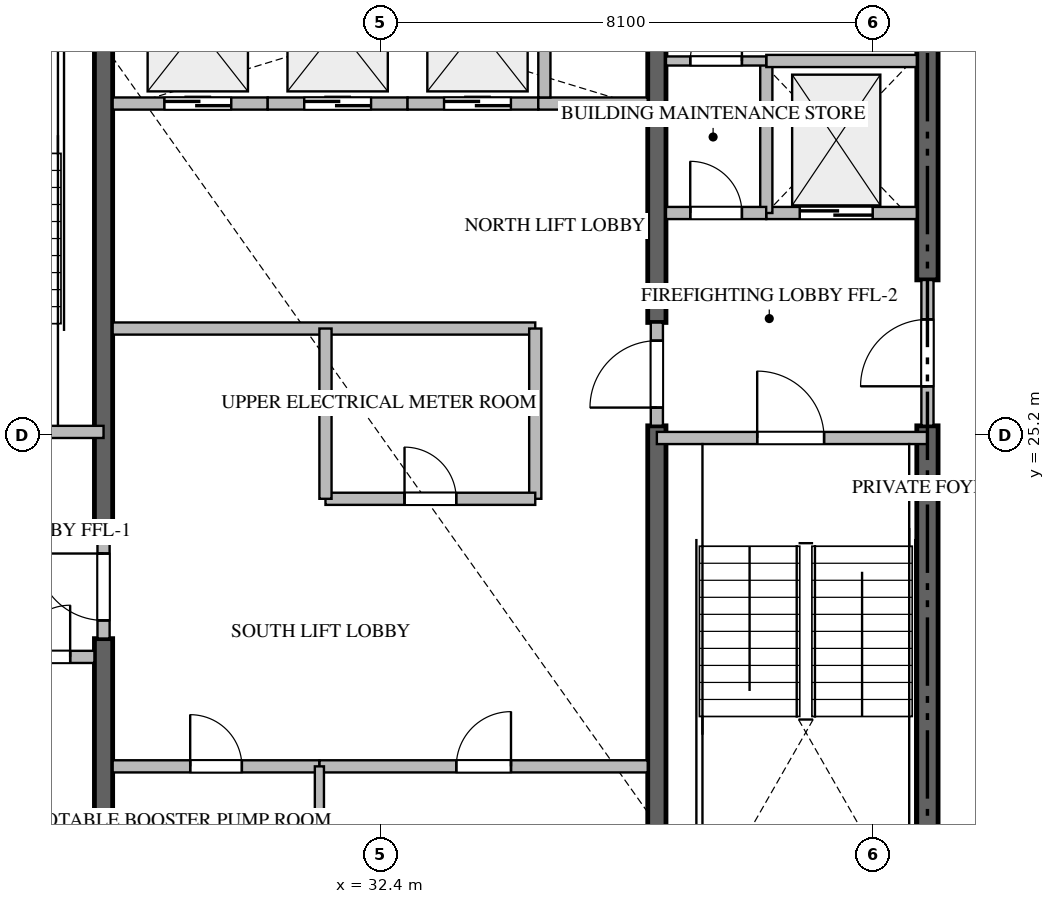
"""IFC4 building model, lengths in metres.
Left out: names, types, materials, properties, quantities, classifications, styles, units other than length and angle.
Written with IfcOpenShell. Run it as: python <this file> out.ifc"""

import sys

from ifc_helpers import new_model, si_unit, direction, frame, frame_2d, origin, place, context, subcontext, project, spatial, rectangle, extrude, source, transform, mapped, element, fill, save


model = new_model("IFC4")
c1 = context("Model", 3, precision=1e-05, world=origin(), true_north=direction((0.0, 1.0)))
c2 = subcontext(c1, "Body", "Model", "MODEL_VIEW")
j1 = project(units=[si_unit("LENGTHUNIT", "METRE"), si_unit("PLANEANGLEUNIT", "RADIAN")], contexts=[c1])
p1 = place(None, origin())
s1 = spatial("IfcSite", under=j1, at=p1, CompositionType="ELEMENT")
p2 = place(p1, origin())
s2 = spatial("IfcBuilding", under=s1, at=p2, CompositionType="ELEMENT")
p3 = place(p2, frame((0.0, 0.0, 279.75)))
s3 = spatial("IfcBuildingStorey", under=s2, at=p3, CompositionType="ELEMENT", Elevation=279.75)
p4 = place(p3, frame((41.4, 16.975, -0.26), z_axis=(0.0, 0.0, 1.0), x_axis=(0.0, 1.0, 0.0)))
e1 = element("IfcWall", 1, at=p4, inside=s3, PredefinedType="SHEAR", context=c2, shape_type="SweptSolid", body=[
    extrude(rectangle(XDim=8.375, YDim=0.35, at=frame_2d((4.188, 0.0))), origin(), (0.0, 0.0, 1.0), 3.848),
])
p5 = place(p3, frame((41.4, 27.75, -0.26), z_axis=(0.0, 0.0, 1.0), x_axis=(0.0, 1.0, 0.0)))
e2 = element("IfcWall", 2, at=p5, inside=s3, PredefinedType="SHEAR", context=c2, shape_type="SweptSolid", body=[
    extrude(rectangle(XDim=5.675, YDim=0.35, at=frame_2d((2.837, 0.0))), origin(), (0.0, 0.0, 1.0), 3.848),
])
p6 = place(p3, frame((27.85, 16.975, -0.26), z_axis=(0.0, 0.0, 1.0), x_axis=(0.0, 1.0, 0.0)))
e3 = element("IfcWall", 3, at=p6, inside=s3, PredefinedType="SHEAR", context=c2, shape_type="SweptSolid", body=[
    extrude(rectangle(XDim=4.875, YDim=0.3, at=frame_2d((2.438, 0.0))), origin(), (0.0, 0.0, 1.0), 3.848),
])
p7 = place(p3, frame((27.85, 23.55, -0.26), z_axis=(0.0, 0.0, 1.0), x_axis=(0.0, 1.0, 0.0)))
e4 = element("IfcWall", 4, at=p7, inside=s3, PredefinedType="SHEAR", context=c2, shape_type="SweptSolid", body=[
    extrude(rectangle(XDim=9.875, YDim=0.3, at=frame_2d((4.938, 0.0))), origin(), (0.0, 0.0, 1.0), 3.848),
])
p8 = place(p3, frame((36.95, 16.975, -0.26), z_axis=(0.0, 0.0, 1.0), x_axis=(0.0, 1.0, 0.0)))
e5 = element("IfcWall", 5, at=p8, inside=s3, PredefinedType="SHEAR", context=c2, shape_type="SweptSolid", body=[
    extrude(rectangle(XDim=8.375, YDim=0.3, at=frame_2d((4.188, 0.0))), origin(), (0.0, 0.0, 1.0), 3.848),
])
p9 = place(p3, frame((36.95, 27.05, -0.26), z_axis=(0.0, 0.0, 1.0), x_axis=(0.0, 1.0, 0.0)))
e6 = element("IfcWall", 6, at=p9, inside=s3, PredefinedType="SHEAR", context=c2, shape_type="SweptSolid", body=[
    extrude(rectangle(XDim=6.375, YDim=0.3, at=frame_2d((3.188, 0.0))), origin(), (0.0, 0.0, 1.0), 3.848),
])
p10 = place(p3, frame((23.4, 25.25, 0.0), z_axis=(0.0, 0.0, 1.0), x_axis=(1.0, 0.0, 0.0)))
e7 = element("IfcWall", 7, at=p10, inside=s3, PredefinedType="STANDARD", context=c2, shape_type="SweptSolid", body=[
    extrude(rectangle(XDim=4.45, YDim=0.2, at=frame_2d((2.225, 0.0))), origin(), (0.0, 0.0, 1.0), 3.59),
])
p11 = place(p10, frame((1.65, 0.0, 0.0)))
e8 = element("IfcOpeningElement", 8, at=p11, cuts=e7, PredefinedType="OPENING", context=c2, shape_type="SweptSolid", body=[
    extrude(rectangle(XDim=1.1, YDim=2.15, at=frame_2d((0.55, 1.075))), frame((0.0, 0.11, 0.0), z_axis=(0.0, -1.0, 0.0), x_axis=(1.0, 0.0, 0.0)), (0.0, 0.0, 1.0), 0.22),
])
p12 = place(p3, frame((36.95, 25.15, 0.0), z_axis=(0.0, 0.0, 1.0), x_axis=(1.0, 0.0, 0.0)))
e9 = element("IfcWall", 9, at=p12, inside=s3, PredefinedType="STANDARD", context=c2, shape_type="SweptSolid", body=[
    extrude(rectangle(XDim=4.45, YDim=0.2, at=frame_2d((2.225, 0.0))), origin(), (0.0, 0.0, 1.0), 3.59),
])
p13 = place(p12, frame((1.65, 0.0, 0.0)))
e10 = element("IfcOpeningElement", 10, at=p13, cuts=e9, PredefinedType="OPENING", context=c2, shape_type="SweptSolid", body=[
    extrude(rectangle(XDim=1.1, YDim=2.15, at=frame_2d((0.55, 1.075))), frame((0.0, 0.11, 0.0), z_axis=(0.0, -1.0, 0.0), x_axis=(1.0, 0.0, 0.0)), (0.0, 0.0, 1.0), 0.22),
])
p14 = place(p3, frame((38.75, 28.85, 0.0), z_axis=(0.0, 0.0, 1.0), x_axis=(1.0, 0.0, 0.0)))
e11 = element("IfcWall", 11, at=p14, inside=s3, PredefinedType="STANDARD", context=c2, shape_type="SweptSolid", body=[
    extrude(rectangle(XDim=2.475, YDim=0.2, at=frame_2d((1.238, 0.0))), origin(), (0.0, 0.0, 1.0), 3.59),
])
p15 = place(p14, frame((0.55, 0.0, 0.0)))
e12 = element("IfcOpeningElement", 12, at=p15, cuts=e11, PredefinedType="OPENING", context=c2, shape_type="SweptSolid", body=[
    extrude(rectangle(XDim=1.2, YDim=2.2, at=frame_2d((0.6, 1.1))), frame((0.0, 0.11, 0.0), z_axis=(0.0, -1.0, 0.0), x_axis=(1.0, 0.0, 0.0)), (0.0, 0.0, 1.0), 0.22),
])
p16 = place(p3, frame((28.0, 30.65, 0.0), z_axis=(0.0, 0.0, 1.0), x_axis=(1.0, 0.0, 0.0)))
e13 = element("IfcWall", 13, at=p16, inside=s3, PredefinedType="STANDARD", context=c2, shape_type="SweptSolid", body=[
    extrude(rectangle(XDim=2.55, YDim=0.2, at=frame_2d((1.275, 0.0))), origin(), (0.0, 0.0, 1.0), 3.59),
])
p17 = place(p16, frame((0.85, 0.0, 0.0)))
e14 = element("IfcOpeningElement", 14, at=p17, cuts=e13, PredefinedType="OPENING", context=c2, shape_type="SweptSolid", body=[
    extrude(rectangle(XDim=1.1, YDim=2.2, at=frame_2d((0.55, 1.1))), frame((0.0, 0.11, 0.0), z_axis=(0.0, -1.0, 0.0), x_axis=(1.0, 0.0, 0.0)), (0.0, 0.0, 1.0), 0.22),
])
p18 = place(p3, frame((30.55, 30.65, 0.0), z_axis=(0.0, 0.0, 1.0), x_axis=(1.0, 0.0, 0.0)))
e15 = element("IfcWall", 15, at=p18, inside=s3, PredefinedType="STANDARD", context=c2, shape_type="SweptSolid", body=[
    extrude(rectangle(XDim=2.3, YDim=0.2, at=frame_2d((1.15, 0.0))), origin(), (0.0, 0.0, 1.0), 3.59),
])
p19 = place(p18, frame((0.6, 0.0, 0.0)))
e16 = element("IfcOpeningElement", 16, at=p19, cuts=e15, PredefinedType="OPENING", context=c2, shape_type="SweptSolid", body=[
    extrude(rectangle(XDim=1.1, YDim=2.2, at=frame_2d((0.55, 1.1))), frame((0.0, 0.11, 0.0), z_axis=(0.0, -1.0, 0.0), x_axis=(1.0, 0.0, 0.0)), (0.0, 0.0, 1.0), 0.22),
])
p20 = place(p3, frame((32.85, 30.65, 0.0), z_axis=(0.0, 0.0, 1.0), x_axis=(1.0, 0.0, 0.0)))
e17 = element("IfcWall", 17, at=p20, inside=s3, PredefinedType="STANDARD", context=c2, shape_type="SweptSolid", body=[
    extrude(rectangle(XDim=2.15, YDim=0.2, at=frame_2d((1.075, 0.0))), origin(), (0.0, 0.0, 1.0), 3.59),
])
p21 = place(p20, frame((0.6, 0.0, 0.0)))
e18 = element("IfcOpeningElement", 18, at=p21, cuts=e17, PredefinedType="OPENING", context=c2, shape_type="SweptSolid", body=[
    extrude(rectangle(XDim=1.1, YDim=2.2, at=frame_2d((0.55, 1.1))), frame((0.0, 0.11, 0.0), z_axis=(0.0, -1.0, 0.0), x_axis=(1.0, 0.0, 0.0)), (0.0, 0.0, 1.0), 0.22),
])
p22 = place(p3, frame((35.0, 30.65, 0.0), z_axis=(0.0, 0.0, 1.0), x_axis=(1.0, 0.0, 0.0)))
e19 = element("IfcWall", 19, at=p22, inside=s3, PredefinedType="STANDARD", context=c2, shape_type="SweptSolid", body=[
    extrude(rectangle(XDim=1.8, YDim=0.2, at=frame_2d((0.9, 0.0))), origin(), (0.0, 0.0, 1.0), 3.59),
])
p23 = place(p3, frame((35.1, 30.75, 0.0), z_axis=(0.0, 0.0, 1.0), x_axis=(0.0, 1.0, 0.0)))
e20 = element("IfcWall", 20, at=p23, inside=s3, PredefinedType="STANDARD", context=c2, shape_type="SweptSolid", body=[
    extrude(rectangle(XDim=2.675, YDim=0.2, at=frame_2d((1.337, 0.0))), origin(), (0.0, 0.0, 1.0), 3.59),
])
p24 = place(p3, frame((26.052, 21.55, 0.0), z_axis=(0.0, 0.0, 1.0), x_axis=(1.0, 0.0, 0.0)))
e21 = element("IfcWall", 21, at=p24, inside=s3, PredefinedType="STANDARD", context=c2, shape_type="SweptSolid", body=[
    extrude(rectangle(XDim=1.648, YDim=0.2, at=frame_2d((0.824, 0.0))), origin(), (0.0, 0.0, 1.0), 3.59),
])
p25 = place(p24, frame((0.399, 0.0, 0.0)))
e22 = element("IfcOpeningElement", 22, at=p25, cuts=e21, PredefinedType="OPENING", context=c2, shape_type="SweptSolid", body=[
    extrude(rectangle(XDim=0.85, YDim=2.1, at=frame_2d((0.425, 1.05))), frame((0.0, 0.11, 0.0), z_axis=(0.0, -1.0, 0.0), x_axis=(1.0, 0.0, 0.0)), (0.0, 0.0, 1.0), 0.22),
])
p26 = place(p3, frame((38.75, 28.85, 0.0), z_axis=(0.0, 0.0, 1.0), x_axis=(0.0, 1.0, 0.0)))
e23 = element("IfcWall", 23, at=p26, inside=s3, PredefinedType="STANDARD", context=c2, shape_type="SweptSolid", body=[
    extrude(rectangle(XDim=2.5, YDim=0.2, at=frame_2d((1.25, 0.0))), origin(), (0.0, 0.0, 1.0), 3.59),
])
p27 = place(p3, frame((38.75, 31.35, 0.0), z_axis=(0.0, 0.0, 1.0), x_axis=(1.0, 0.0, 0.0)))
e24 = element("IfcWall", 24, at=p27, inside=s3, PredefinedType="STANDARD", context=c2, shape_type="SweptSolid", body=[
    extrude(rectangle(XDim=2.475, YDim=0.2, at=frame_2d((1.238, 0.0))), origin(), (0.0, 0.0, 1.0), 3.59),
])
p28 = place(p3, frame((37.1, 28.85, 0.0), z_axis=(0.0, 0.0, 1.0), x_axis=(1.0, 0.0, 0.0)))
e25 = element("IfcWall", 25, at=p28, inside=s3, PredefinedType="STANDARD", context=c2, shape_type="SweptSolid", body=[
    extrude(rectangle(XDim=1.648, YDim=0.2, at=frame_2d((0.824, 0.0))), origin(), (0.0, 0.0, 1.0), 3.59),
])
p29 = place(p28, frame((0.399, 0.0, 0.0)))
e26 = element("IfcOpeningElement", 26, at=p29, cuts=e25, PredefinedType="OPENING", context=c2, shape_type="SweptSolid", body=[
    extrude(rectangle(XDim=0.85, YDim=2.1, at=frame_2d((0.425, 1.05))), frame((0.0, 0.11, 0.0), z_axis=(0.0, -1.0, 0.0), x_axis=(1.0, 0.0, 0.0)), (0.0, 0.0, 1.0), 0.22),
])
p30 = place(p3, frame((41.4, 25.352, 0.0), z_axis=(0.0, 0.0, 1.0), x_axis=(0.0, 1.0, 0.0)))
e27 = element("IfcWall", 27, at=p30, inside=s3, PredefinedType="STANDARD", context=c2, shape_type="SweptSolid", body=[
    extrude(rectangle(XDim=2.396, YDim=0.2, at=frame_2d((1.198, 0.0))), origin(), (0.0, 0.0, 1.0), 3.59),
])
p31 = place(p30, frame((0.648, 0.0, 0.0)))
e28 = element("IfcOpeningElement", 28, at=p31, cuts=e27, PredefinedType="OPENING", context=c2, shape_type="SweptSolid", body=[
    extrude(rectangle(XDim=1.1, YDim=2.15, at=frame_2d((0.55, 1.075))), frame((0.0, 0.11, 0.0), z_axis=(0.0, -1.0, 0.0), x_axis=(1.0, 0.0, 0.0)), (0.0, 0.0, 1.0), 0.22),
])
p32 = place(p3, frame((27.85, 21.852, 0.0), z_axis=(0.0, 0.0, 1.0), x_axis=(0.0, 1.0, 0.0)))
e29 = element("IfcWall", 29, at=p32, inside=s3, PredefinedType="STANDARD", context=c2, shape_type="SweptSolid", body=[
    extrude(rectangle(XDim=1.696, YDim=0.2, at=frame_2d((0.848, 0.0))), origin(), (0.0, 0.0, 1.0), 3.59),
])
p33 = place(p32, frame((0.298, 0.0, 0.0)))
e30 = element("IfcOpeningElement", 30, at=p33, cuts=e29, PredefinedType="OPENING", context=c2, shape_type="SweptSolid", body=[
    extrude(rectangle(XDim=1.1, YDim=2.15, at=frame_2d((0.55, 1.075))), frame((0.0, 0.11, 0.0), z_axis=(0.0, -1.0, 0.0), x_axis=(1.0, 0.0, 0.0)), (0.0, 0.0, 1.0), 0.22),
])
p34 = place(p3, frame((36.95, 25.352, 0.0), z_axis=(0.0, 0.0, 1.0), x_axis=(0.0, 1.0, 0.0)))
e31 = element("IfcWall", 31, at=p34, inside=s3, PredefinedType="STANDARD", context=c2, shape_type="SweptSolid", body=[
    extrude(rectangle(XDim=1.696, YDim=0.2, at=frame_2d((0.848, 0.0))), origin(), (0.0, 0.0, 1.0), 3.59),
])
p35 = place(p34, frame((0.298, 0.0, 0.0)))
e32 = element("IfcOpeningElement", 32, at=p35, cuts=e31, PredefinedType="OPENING", context=c2, shape_type="SweptSolid", body=[
    extrude(rectangle(XDim=1.1, YDim=2.15, at=frame_2d((0.55, 1.075))), frame((0.0, 0.11, 0.0), z_axis=(0.0, -1.0, 0.0), x_axis=(1.0, 0.0, 0.0)), (0.0, 0.0, 1.0), 0.22),
])
p36 = place(p3, frame((37.1, 31.35, 0.0), z_axis=(0.0, 0.0, 1.0), x_axis=(1.0, 0.0, 0.0)))
e33 = element("IfcWall", 33, at=p36, inside=s3, PredefinedType="PARTITIONING", context=c2, shape_type="SweptSolid", body=[
    extrude(rectangle(XDim=1.648, YDim=0.15, at=frame_2d((0.824, 0.0))), origin(), (0.0, 0.0, 1.0), 3.59),
])
p37 = place(p36, frame((0.399, 0.0, 0.0)))
e34 = element("IfcOpeningElement", 34, at=p37, cuts=e33, PredefinedType="OPENING", context=c2, shape_type="SweptSolid", body=[
    extrude(rectangle(XDim=0.85, YDim=2.1, at=frame_2d((0.425, 1.05))), frame((0.0, 0.085, 0.0), z_axis=(0.0, -1.0, 0.0), x_axis=(1.0, 0.0, 0.0)), (0.0, 0.0, 1.0), 0.17),
])
p38 = place(p3, frame((28.0, 19.75, 0.0), z_axis=(0.0, 0.0, 1.0), x_axis=(1.0, 0.0, 0.0)))
e35 = element("IfcWall", 35, at=p38, inside=s3, PredefinedType="STANDARD", context=c2, shape_type="SweptSolid", body=[
    extrude(rectangle(XDim=3.4, YDim=0.2, at=frame_2d((1.7, 0.0))), origin(), (0.0, 0.0, 1.0), 3.59),
])
p39 = place(p38, frame((1.275, 0.0, 0.0)))
e36 = element("IfcOpeningElement", 36, at=p39, cuts=e35, PredefinedType="OPENING", context=c2, shape_type="SweptSolid", body=[
    extrude(rectangle(XDim=0.85, YDim=2.1, at=frame_2d((0.425, 1.05))), frame((0.0, 0.11, 0.0), z_axis=(0.0, -1.0, 0.0), x_axis=(1.0, 0.0, 0.0)), (0.0, 0.0, 1.0), 0.22),
])
p40 = place(p3, frame((31.402, 19.75, 0.0), z_axis=(0.0, 0.0, 1.0), x_axis=(1.0, 0.0, 0.0)))
e37 = element("IfcWall", 37, at=p40, inside=s3, PredefinedType="STANDARD", context=c2, shape_type="SweptSolid", body=[
    extrude(rectangle(XDim=5.398, YDim=0.2, at=frame_2d((2.699, 0.0))), origin(), (0.0, 0.0, 1.0), 3.59),
])
p41 = place(p40, frame((2.249, 0.0, 0.0)))
e38 = element("IfcOpeningElement", 38, at=p41, cuts=e37, PredefinedType="OPENING", context=c2, shape_type="SweptSolid", body=[
    extrude(rectangle(XDim=0.9, YDim=2.1, at=frame_2d((0.45, 1.05))), frame((0.0, 0.11, 0.0), z_axis=(0.0, -1.0, 0.0), x_axis=(1.0, 0.0, 0.0)), (0.0, 0.0, 1.0), 0.22),
])
p42 = place(p3, frame((31.4, 17.02, 0.0), z_axis=(0.0, 0.0, 1.0), x_axis=(0.0, 1.0, 0.0)))
e39 = element("IfcWall", 39, at=p42, inside=s3, PredefinedType="PARTITIONING", context=c2, shape_type="SweptSolid", body=[
    extrude(rectangle(XDim=2.73, YDim=0.15, at=frame_2d((1.365, 0.0))), origin(), (0.0, 0.0, 1.0), 3.59),
])
p43 = place(p3, frame((28.0, 26.95, 0.0), z_axis=(0.0, 0.0, 1.0), x_axis=(1.0, 0.0, 0.0)))
e40 = element("IfcWall", 40, at=p43, inside=s3, PredefinedType="STANDARD", context=c2, shape_type="SweptSolid", body=[
    extrude(rectangle(XDim=6.95, YDim=0.2, at=frame_2d((3.475, 0.0))), origin(), (0.0, 0.0, 1.0), 3.59),
])
p44 = place(p3, frame((34.95, 24.15, 0.0), z_axis=(0.0, 0.0, 1.0), x_axis=(0.0, 1.0, 0.0)))
e41 = element("IfcWall", 41, at=p44, inside=s3, PredefinedType="STANDARD", context=c2, shape_type="SweptSolid", body=[
    extrude(rectangle(XDim=2.8, YDim=0.2, at=frame_2d((1.4, 0.0))), origin(), (0.0, 0.0, 1.0), 3.59),
])
p45 = place(p3, frame((31.5, 24.15, 0.0), z_axis=(0.0, 0.0, 1.0), x_axis=(1.0, 0.0, 0.0)))
e42 = element("IfcWall", 42, at=p45, inside=s3, PredefinedType="STANDARD", context=c2, shape_type="SweptSolid", body=[
    extrude(rectangle(XDim=3.45, YDim=0.2, at=frame_2d((1.725, 0.0))), origin(), (0.0, 0.0, 1.0), 3.59),
])
p46 = place(p45, frame((1.3, 0.0, 0.0)))
e43 = element("IfcOpeningElement", 43, at=p46, cuts=e42, PredefinedType="OPENING", context=c2, shape_type="SweptSolid", body=[
    extrude(rectangle(XDim=0.85, YDim=2.1, at=frame_2d((0.425, 1.05))), frame((0.0, 0.11, 0.0), z_axis=(0.0, -1.0, 0.0), x_axis=(1.0, 0.0, 0.0)), (0.0, 0.0, 1.0), 0.22),
])
p47 = place(p3, frame((31.5, 24.15, 0.0), z_axis=(0.0, 0.0, 1.0), x_axis=(0.0, 1.0, 0.0)))
e44 = element("IfcWall", 44, at=p47, inside=s3, PredefinedType="STANDARD", context=c2, shape_type="SweptSolid", body=[
    extrude(rectangle(XDim=2.8, YDim=0.2, at=frame_2d((1.4, 0.0))), origin(), (0.0, 0.0, 1.0), 3.59),
])
m1 = source(origin(), c2, "Body", "SweptSolid", [
    extrude(rectangle(XDim=1.1, YDim=2.15, at=frame_2d((0.55, 1.075))), frame((0.0, 0.025, 0.0), z_axis=(0.0, -1.0, 0.0), x_axis=(1.0, 0.0, 0.0)), (0.0, 0.0, 1.0), 0.05),
])
p48 = place(p13, origin())
e45 = element("IfcDoor", 45, at=p48, inside=s3, OperationType="SINGLE_SWING_LEFT", PredefinedType="DOOR", context=c2, shape_type="MappedRepresentation", body=[
    mapped(m1, transform((0.0, 0.0, 0.0), scale=1.0)),
])
fill(e10, e45)
m2 = source(origin(), c2, "Body", "SweptSolid", [
    extrude(rectangle(XDim=1.2, YDim=2.2, at=frame_2d((0.6, 1.1))), frame((0.0, 0.025, 0.0), z_axis=(0.0, -1.0, 0.0), x_axis=(1.0, 0.0, 0.0)), (0.0, 0.0, 1.0), 0.05),
])
p49 = place(p15, origin())
e46 = element("IfcDoor", 46, at=p49, inside=s3, OperationType="DOUBLE_DOOR_SLIDING", PredefinedType="DOOR", context=c2, shape_type="MappedRepresentation", body=[
    mapped(m2, transform((0.0, 0.0, 0.0), scale=1.0)),
])
fill(e12, e46)
m3 = source(origin(), c2, "Body", "SweptSolid", [
    extrude(rectangle(XDim=1.1, YDim=2.2, at=frame_2d((0.55, 1.1))), frame((0.0, 0.025, 0.0), z_axis=(0.0, -1.0, 0.0), x_axis=(1.0, 0.0, 0.0)), (0.0, 0.0, 1.0), 0.05),
])
p50 = place(p17, origin())
e47 = element("IfcDoor", 47, at=p50, inside=s3, OperationType="DOUBLE_DOOR_SLIDING", PredefinedType="DOOR", context=c2, shape_type="MappedRepresentation", body=[
    mapped(m3, transform((0.0, 0.0, 0.0), scale=1.0)),
])
fill(e14, e47)
p51 = place(p19, origin())
e48 = element("IfcDoor", 48, at=p51, inside=s3, OperationType="DOUBLE_DOOR_SLIDING", PredefinedType="DOOR", context=c2, shape_type="MappedRepresentation", body=[
    mapped(m3, transform((0.0, 0.0, 0.0), scale=1.0)),
])
fill(e16, e48)
p52 = place(p21, origin())
e49 = element("IfcDoor", 49, at=p52, inside=s3, OperationType="DOUBLE_DOOR_SLIDING", PredefinedType="DOOR", context=c2, shape_type="MappedRepresentation", body=[
    mapped(m3, transform((0.0, 0.0, 0.0), scale=1.0)),
])
fill(e18, e49)
m4 = source(origin(), c2, "Body", "SweptSolid", [
    extrude(rectangle(XDim=0.85, YDim=2.1, at=frame_2d((0.425, 1.05))), frame((0.0, 0.025, 0.0), z_axis=(0.0, -1.0, 0.0), x_axis=(1.0, 0.0, 0.0)), (0.0, 0.0, 1.0), 0.05),
])
p53 = place(p25, origin())
e50 = element("IfcDoor", 50, at=p53, inside=s3, OperationType="SINGLE_SWING_RIGHT", PredefinedType="DOOR", context=c2, shape_type="MappedRepresentation", body=[
    mapped(m4, transform((0.0, 0.0, 0.0), scale=1.0)),
])
fill(e22, e50)
p54 = place(p29, origin())
e51 = element("IfcDoor", 51, at=p54, inside=s3, OperationType="SINGLE_SWING_LEFT", PredefinedType="DOOR", context=c2, shape_type="MappedRepresentation", body=[
    mapped(m4, transform((0.0, 0.0, 0.0), scale=1.0)),
])
fill(e26, e51)
p55 = place(p31, origin())
e52 = element("IfcDoor", 52, at=p55, inside=s3, OperationType="SINGLE_SWING_LEFT", PredefinedType="DOOR", context=c2, shape_type="MappedRepresentation", body=[
    mapped(m1, transform((0.0, 0.0, 0.0), scale=1.0)),
])
fill(e28, e52)
p56 = place(p33, origin())
e53 = element("IfcDoor", 53, at=p56, inside=s3, OperationType="SINGLE_SWING_RIGHT", PredefinedType="DOOR", context=c2, shape_type="MappedRepresentation", body=[
    mapped(m1, transform((0.0, 0.0, 0.0), scale=1.0)),
])
fill(e30, e53)
p57 = place(p35, origin())
e54 = element("IfcDoor", 54, at=p57, inside=s3, OperationType="SINGLE_SWING_LEFT", PredefinedType="DOOR", context=c2, shape_type="MappedRepresentation", body=[
    mapped(m1, transform((0.0, 0.0, 0.0), scale=1.0)),
])
fill(e32, e54)
p58 = place(p37, origin())
e55 = element("IfcDoor", 55, at=p58, inside=s3, OperationType="SINGLE_SWING_RIGHT", PredefinedType="DOOR", context=c2, shape_type="MappedRepresentation", body=[
    mapped(m4, transform((0.0, 0.0, 0.0), scale=1.0)),
])
fill(e34, e55)
p59 = place(p39, origin())
e56 = element("IfcDoor", 56, at=p59, inside=s3, OperationType="SINGLE_SWING_LEFT", PredefinedType="DOOR", context=c2, shape_type="MappedRepresentation", body=[
    mapped(m4, transform((0.0, 0.0, 0.0), scale=1.0)),
])
fill(e36, e56)
m5 = source(origin(), c2, "Body", "SweptSolid", [
    extrude(rectangle(XDim=0.9, YDim=2.1, at=frame_2d((0.45, 1.05))), frame((0.0, 0.025, 0.0), z_axis=(0.0, -1.0, 0.0), x_axis=(1.0, 0.0, 0.0)), (0.0, 0.0, 1.0), 0.05),
])
p60 = place(p41, origin())
e57 = element("IfcDoor", 57, at=p60, inside=s3, OperationType="SINGLE_SWING_RIGHT", PredefinedType="DOOR", context=c2, shape_type="MappedRepresentation", body=[
    mapped(m5, transform((0.0, 0.0, 0.0), scale=1.0)),
])
fill(e38, e57)
p61 = place(p46, origin())
e58 = element("IfcDoor", 58, at=p61, inside=s3, OperationType="SINGLE_SWING_LEFT", PredefinedType="DOOR", context=c2, shape_type="MappedRepresentation", body=[
    mapped(m4, transform((0.0, 0.0, 0.0), scale=1.0)),
])
fill(e43, e58)
save(model, sys.argv[1])
